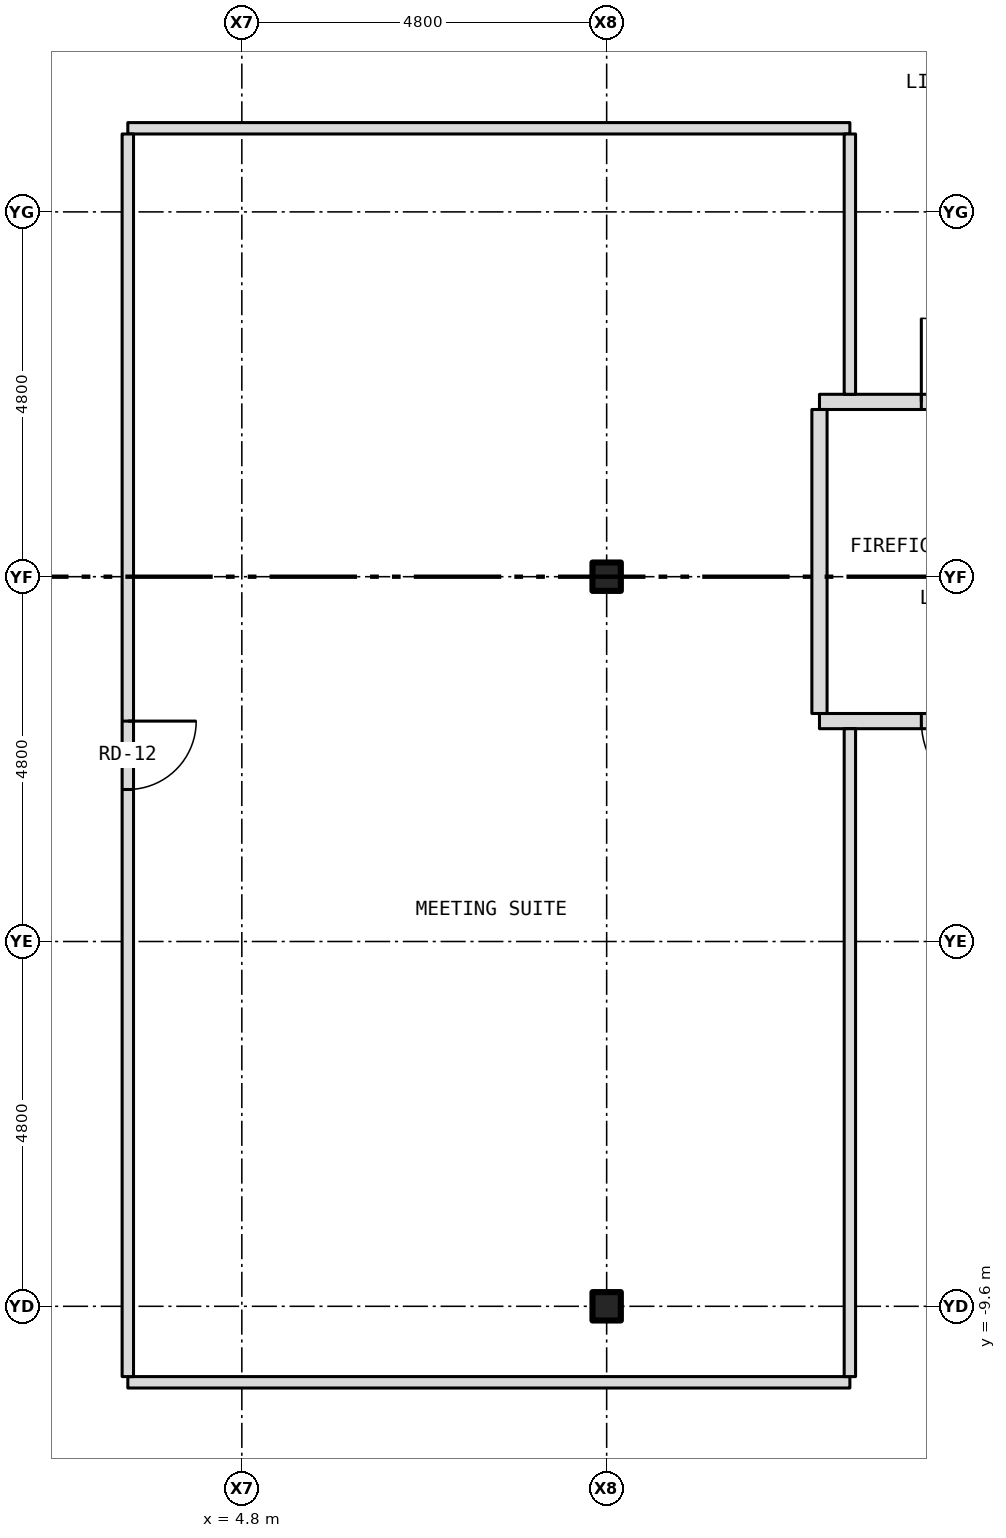
"""IFC4 building model, lengths in metres.
Left out: names, types, materials, properties, quantities, classifications, styles, units other than length and angle.
Written with IfcOpenShell. Run it as: python <this file> out.ifc"""

import sys

from ifc_helpers import new_model, si_unit, direction, frame, frame_2d, origin, origin_2d, place, context, subcontext, project, spatial, rectangle, i_section, extrude, element, fill, save


model = new_model("IFC4")
c1 = context("Model", 3, precision=1e-05, world=origin(), true_north=direction((0.0, 1.0)))
c2 = subcontext(c1, "Body", "Model", "MODEL_VIEW")
j1 = project(units=[si_unit("LENGTHUNIT", "METRE"), si_unit("PLANEANGLEUNIT", "RADIAN")], contexts=[c1])
p1 = place(None, origin())
s1 = spatial("IfcSite", under=j1, at=p1, CompositionType="ELEMENT")
p2 = place(p1, origin())
s2 = spatial("IfcBuilding", under=s1, at=p2, CompositionType="ELEMENT")
p3 = place(p2, frame((0.0, 0.0, 208.5)))
s3 = spatial("IfcBuildingStorey", under=s2, at=p3, CompositionType="ELEMENT", Elevation=208.5)
for number, where, z_axis, x_axis in (
    (1, (9.6, -9.6, -0.15), (0.0, 0.0, 1.0), (1.0, 0.0, 0.0)),
    (2, (9.6, 0.0, -0.15), (0.0, 0.0, 1.0), (1.0, 0.0, 0.0)),
):
    element("IfcColumn", number, at=place(p3, frame(where, z_axis=z_axis, x_axis=x_axis)), inside=s3, PredefinedType="COLUMN", context=c2, shape_type="SweptSolid", body=[
        extrude(i_section(OverallWidth=0.373, OverallDepth=0.373, WebThickness=0.016, FlangeThickness=0.026, at=origin_2d()), origin(), (0.0, 0.0, 1.0), 3.5),
    ])
p4 = place(p3, frame((3.3, -10.6, 0.0), z_axis=(0.0, 0.0, 1.0), x_axis=(1.0, 0.0, 0.0)))
e3 = element("IfcWall", 3, at=p4, inside=s3, PredefinedType="PARTITIONING", context=c2, shape_type="SweptSolid", body=[
    extrude(rectangle(XDim=9.5, YDim=0.15, at=frame_2d((4.75, 0.0))), origin(), (0.0, 0.0, 1.0), 3.35),
])
p5 = place(p3, frame((12.4, -1.9, 0.0), z_axis=(0.0, 0.0, 1.0), x_axis=(1.0, 0.0, 0.0)))
e4 = element("IfcWall", 4, at=p5, inside=s3, PredefinedType="PARTITIONING", context=c2, shape_type="SweptSolid", body=[
    extrude(rectangle(XDim=3.28, YDim=0.2, at=frame_2d((1.64, 0.0))), origin(), (0.0, 0.0, 1.0), 3.35),
])
p6 = place(p5, frame((1.34, 0.0, 0.0)))
e5 = element("IfcOpeningElement", 5, at=p6, cuts=e4, PredefinedType="OPENING", context=c2, shape_type="SweptSolid", body=[
    extrude(rectangle(XDim=1.1, YDim=2.1, at=frame_2d((0.55, 1.05))), frame((0.0, 0.112, 0.0), z_axis=(0.0, -1.0, 0.0), x_axis=(1.0, 0.0, 0.0)), (0.0, 0.0, 1.0), 0.224),
])
p7 = place(p3, frame((12.4, 2.3, 0.0), z_axis=(0.0, 0.0, 1.0), x_axis=(1.0, 0.0, 0.0)))
e6 = element("IfcWall", 6, at=p7, inside=s3, PredefinedType="PARTITIONING", context=c2, shape_type="SweptSolid", body=[
    extrude(rectangle(XDim=3.28, YDim=0.2, at=frame_2d((1.64, 0.0))), origin(), (0.0, 0.0, 1.0), 3.35),
])
p8 = place(p7, frame((1.34, 0.0, 0.0)))
e7 = element("IfcOpeningElement", 7, at=p8, cuts=e6, PredefinedType="OPENING", context=c2, shape_type="SweptSolid", body=[
    extrude(rectangle(XDim=1.1, YDim=2.1, at=frame_2d((0.55, 1.05))), frame((0.0, 0.112, 0.0), z_axis=(0.0, -1.0, 0.0), x_axis=(1.0, 0.0, 0.0)), (0.0, 0.0, 1.0), 0.224),
])
p9 = place(p3, frame((3.3, 5.9, 0.0), z_axis=(0.0, 0.0, 1.0), x_axis=(1.0, 0.0, 0.0)))
e8 = element("IfcWall", 8, at=p9, inside=s3, PredefinedType="PARTITIONING", context=c2, shape_type="SweptSolid", body=[
    extrude(rectangle(XDim=9.5, YDim=0.15, at=frame_2d((4.75, 0.0))), origin(), (0.0, 0.0, 1.0), 3.35),
])
p10 = place(p3, frame((3.3, -10.525, 0.0), z_axis=(0.0, 0.0, 1.0), x_axis=(0.0, 1.0, 0.0)))
e9 = element("IfcWall", 9, at=p10, inside=s3, PredefinedType="PARTITIONING", context=c2, shape_type="SweptSolid", body=[
    extrude(rectangle(XDim=16.35, YDim=0.15, at=frame_2d((8.175, 0.0))), origin(), (0.0, 0.0, 1.0), 3.35),
])
p11 = place(p10, frame((7.725, 0.0, 0.0)))
e10 = element("IfcOpeningElement", 10, at=p11, cuts=e9, PredefinedType="OPENING", context=c2, shape_type="SweptSolid", body=[
    extrude(rectangle(XDim=0.9, YDim=2.1, at=frame_2d((0.45, 1.05))), frame((0.0, 0.087, 0.0), z_axis=(0.0, -1.0, 0.0), x_axis=(1.0, 0.0, 0.0)), (0.0, 0.0, 1.0), 0.174),
])
p12 = place(p3, frame((12.4, -1.8, 0.0), z_axis=(0.0, 0.0, 1.0), x_axis=(0.0, 1.0, 0.0)))
e11 = element("IfcWall", 11, at=p12, inside=s3, PredefinedType="PARTITIONING", context=c2, shape_type="SweptSolid", body=[
    extrude(rectangle(XDim=4.0, YDim=0.2, at=frame_2d((2.0, 0.0))), origin(), (0.0, 0.0, 1.0), 3.35),
])
p13 = place(p3, frame((12.8, -10.525, 0.0), z_axis=(0.0, 0.0, 1.0), x_axis=(0.0, 1.0, 0.0)))
e12 = element("IfcWall", 12, at=p13, inside=s3, PredefinedType="PARTITIONING", context=c2, shape_type="SweptSolid", body=[
    extrude(rectangle(XDim=8.525, YDim=0.15, at=frame_2d((4.262, 0.0))), origin(), (0.0, 0.0, 1.0), 3.35),
])
p14 = place(p3, frame((12.8, 2.4, 0.0), z_axis=(0.0, 0.0, 1.0), x_axis=(0.0, 1.0, 0.0)))
e13 = element("IfcWall", 13, at=p14, inside=s3, PredefinedType="PARTITIONING", context=c2, shape_type="SweptSolid", body=[
    extrude(rectangle(XDim=3.425, YDim=0.15, at=frame_2d((1.712, 0.0))), origin(), (0.0, 0.0, 1.0), 3.35),
])
p15 = place(p8, origin())
e14 = element("IfcDoor", 14, at=p15, inside=s3, OperationType="SINGLE_SWING_LEFT", PredefinedType="DOOR", context=c2, shape_type="SweptSolid", body=[
    extrude(rectangle(XDim=1.1, YDim=2.1, at=frame_2d((0.55, 1.05))), frame((0.0, 0.025, 0.0), z_axis=(0.0, -1.0, 0.0), x_axis=(1.0, 0.0, 0.0)), (0.0, 0.0, 1.0), 0.05),
])
fill(e7, e14)
p16 = place(p6, origin())
e15 = element("IfcDoor", 15, at=p16, inside=s3, OperationType="SINGLE_SWING_RIGHT", PredefinedType="DOOR", context=c2, shape_type="SweptSolid", body=[
    extrude(rectangle(XDim=1.1, YDim=2.1, at=frame_2d((0.55, 1.05))), frame((0.0, 0.025, 0.0), z_axis=(0.0, -1.0, 0.0), x_axis=(1.0, 0.0, 0.0)), (0.0, 0.0, 1.0), 0.05),
])
fill(e5, e15)
p17 = place(p11, origin())
e16 = element("IfcDoor", 16, at=p17, inside=s3, OperationType="SINGLE_SWING_RIGHT", PredefinedType="DOOR", context=c2, shape_type="SweptSolid", body=[
    extrude(rectangle(XDim=0.9, YDim=2.1, at=frame_2d((0.45, 1.05))), frame((0.0, 0.025, 0.0), z_axis=(0.0, -1.0, 0.0), x_axis=(1.0, 0.0, 0.0)), (0.0, 0.0, 1.0), 0.05),
])
fill(e10, e16)
save(model, sys.argv[1])
